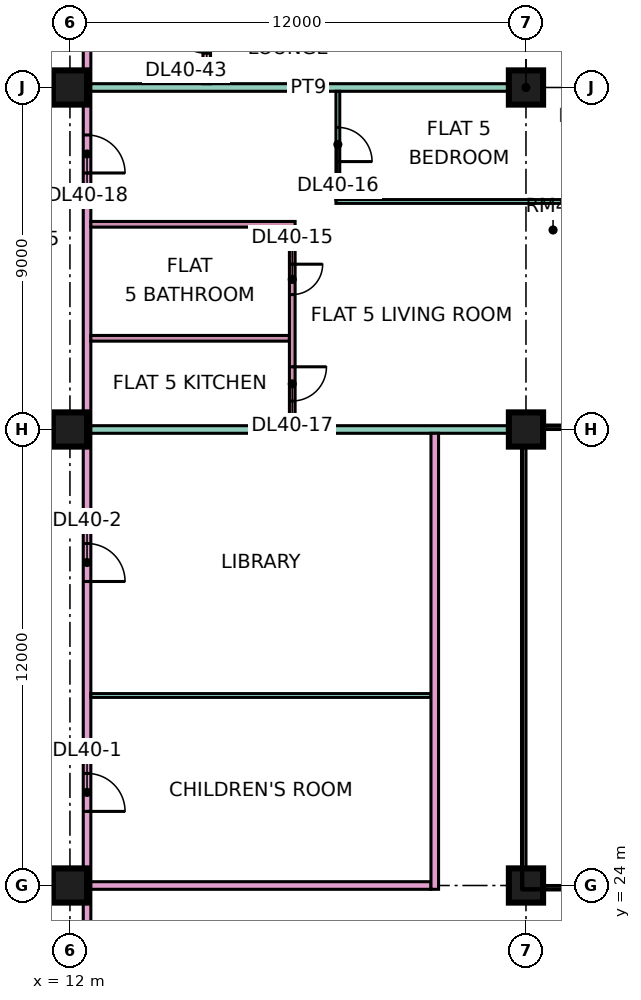
"""IFC4 building model, lengths in metres.
Left out: names, types, materials, properties, quantities, classifications, styles, units other than length and angle.
Written with IfcOpenShell. Run it as: python <this file> out.ifc"""

import sys

from ifc_helpers import new_model, si_unit, direction, frame, frame_2d, origin, origin_2d, place, context, subcontext, project, spatial, rectangle, extrude, element, fill, save


model = new_model("IFC4")
c1 = context("Model", 3, precision=1e-05, world=origin(), true_north=direction((0.0, 1.0)))
c2 = subcontext(c1, "Body", "Model", "MODEL_VIEW")
j1 = project(units=[si_unit("LENGTHUNIT", "METRE"), si_unit("PLANEANGLEUNIT", "RADIAN")], contexts=[c1])
p1 = place(None, origin())
s1 = spatial("IfcSite", under=j1, at=p1, CompositionType="ELEMENT")
p2 = place(p1, origin())
s2 = spatial("IfcBuilding", under=s1, at=p2, CompositionType="ELEMENT")
p3 = place(p2, frame((0.0, 0.0, 176.15)))
s3 = spatial("IfcBuildingStorey", under=s2, at=p3, CompositionType="ELEMENT", Elevation=176.15)
for number, where, z_axis, x_axis in (
    (1, (12.0, 24.0, 0.0), (0.0, 0.0, 1.0), (1.0, 0.0, 0.0)),
    (2, (12.0, 36.0, 0.0), (0.0, 0.0, 1.0), (1.0, 0.0, 0.0)),
    (3, (12.0, 45.0, 0.0), (0.0, 0.0, 1.0), (1.0, 0.0, 0.0)),
    (4, (24.0, 24.0, 0.0), (0.0, 0.0, 1.0), (1.0, 0.0, 0.0)),
    (5, (24.0, 36.0, 0.0), (0.0, 0.0, 1.0), (1.0, 0.0, 0.0)),
    (6, (24.0, 45.0, 0.0), (0.0, 0.0, 1.0), (1.0, 0.0, 0.0)),
):
    element("IfcColumn", number, at=place(p3, frame(where, z_axis=z_axis, x_axis=x_axis)), inside=s3, PredefinedType="COLUMN", context=c2, shape_type="SweptSolid", body=[
        extrude(rectangle(XDim=0.9, YDim=0.9, at=origin_2d()), origin(), (0.0, 0.0, 1.0), 3.75),
    ])
p4 = place(p3, frame((12.45, 20.0, 0.0), z_axis=(0.0, 0.0, 1.0), x_axis=(0.0, 1.0, 0.0)))
e7 = element("IfcWall", 7, at=p4, inside=s3, PredefinedType="PARTITIONING", context=c2, shape_type="SweptSolid", body=[
    extrude(rectangle(XDim=43.0, YDim=0.2, at=frame_2d((21.5, 0.0))), origin(), (0.0, 0.0, 1.0), 3.35),
])
p5 = place(p4, frame((5.95, 0.0, 0.0)))
e8 = element("IfcOpeningElement", 8, at=p5, cuts=e7, PredefinedType="OPENING", context=c2, shape_type="SweptSolid", body=[
    extrude(rectangle(XDim=1.0, YDim=2.1, at=frame_2d((0.5, 1.05))), frame((0.0, 0.11, 0.0), z_axis=(0.0, -1.0, 0.0), x_axis=(1.0, 0.0, 0.0)), (0.0, 0.0, 1.0), 0.22),
])
p6 = place(p4, frame((12.0, 0.0, 0.0)))
e9 = element("IfcOpeningElement", 9, at=p6, cuts=e7, PredefinedType="OPENING", context=c2, shape_type="SweptSolid", body=[
    extrude(rectangle(XDim=1.0, YDim=2.1, at=frame_2d((0.5, 1.05))), frame((0.0, 0.11, 0.0), z_axis=(0.0, -1.0, 0.0), x_axis=(1.0, 0.0, 0.0)), (0.0, 0.0, 1.0), 0.22),
])
p7 = place(p4, frame((22.75, 0.0, 0.0)))
e10 = element("IfcOpeningElement", 10, at=p7, cuts=e7, PredefinedType="OPENING", context=c2, shape_type="SweptSolid", body=[
    extrude(rectangle(XDim=1.0, YDim=2.1, at=frame_2d((0.5, 1.05))), frame((0.0, 0.11, 0.0), z_axis=(0.0, -1.0, 0.0), x_axis=(1.0, 0.0, 0.0)), (0.0, 0.0, 1.0), 0.22),
])
p8 = place(p4, frame((34.75, 0.0, 0.0)))
e11 = element("IfcOpeningElement", 11, at=p8, cuts=e7, PredefinedType="OPENING", context=c2, shape_type="SweptSolid", body=[
    extrude(rectangle(XDim=1.0, YDim=2.1, at=frame_2d((0.5, 1.05))), frame((0.0, 0.11, 0.0), z_axis=(0.0, -1.0, 0.0), x_axis=(1.0, 0.0, 0.0)), (0.0, 0.0, 1.0), 0.22),
])
p9 = place(p4, frame((1.15, 0.0, 0.0)))
e12 = element("IfcOpeningElement", 12, at=p9, cuts=e7, PredefinedType="OPENING", context=c2, shape_type="SweptSolid", body=[
    extrude(rectangle(XDim=1.8, YDim=2.1, at=frame_2d((0.9, 1.05))), frame((0.0, 0.11, 0.0), z_axis=(0.0, -1.0, 0.0), x_axis=(1.0, 0.0, 0.0)), (0.0, 0.0, 1.0), 0.22),
])
p10 = place(p4, frame((28.6, 0.0, 0.0)))
e13 = element("IfcOpeningElement", 13, at=p10, cuts=e7, PredefinedType="OPENING", context=c2, shape_type="SweptSolid", body=[
    extrude(rectangle(XDim=1.8, YDim=2.1, at=frame_2d((0.9, 1.05))), frame((0.0, 0.11, 0.0), z_axis=(0.0, -1.0, 0.0), x_axis=(1.0, 0.0, 0.0)), (0.0, 0.0, 1.0), 0.22),
])
p11 = place(p3, frame((12.55, 24.0, 0.0), z_axis=(0.0, 0.0, 1.0), x_axis=(1.0, 0.0, 0.0)))
e14 = element("IfcWall", 14, at=p11, inside=s3, PredefinedType="PARTITIONING", context=c2, shape_type="SweptSolid", body=[
    extrude(rectangle(XDim=8.95, YDim=0.2, at=frame_2d((4.475, 0.0))), origin(), (0.0, 0.0, 1.0), 3.35),
])
p12 = place(p3, frame((12.55, 29.0, 0.0), z_axis=(0.0, 0.0, 1.0), x_axis=(1.0, 0.0, 0.0)))
e15 = element("IfcWall", 15, at=p12, inside=s3, PredefinedType="PARTITIONING", context=c2, shape_type="SweptSolid", body=[
    extrude(rectangle(XDim=8.95, YDim=0.1, at=frame_2d((4.475, 0.0))), origin(), (0.0, 0.0, 1.0), 3.35),
])
p13 = place(p3, frame((12.55, 36.0, 0.0), z_axis=(0.0, 0.0, 1.0), x_axis=(1.0, 0.0, 0.0)))
e16 = element("IfcWall", 16, at=p13, inside=s3, PredefinedType="PARTITIONING", context=c2, shape_type="SweptSolid", body=[
    extrude(rectangle(XDim=11.45, YDim=0.2, at=frame_2d((5.725, 0.0))), origin(), (0.0, 0.0, 1.0), 3.35),
])
p14 = place(p3, frame((12.55, 38.4, 0.0), z_axis=(0.0, 0.0, 1.0), x_axis=(1.0, 0.0, 0.0)))
e17 = element("IfcWall", 17, at=p14, inside=s3, PredefinedType="PARTITIONING", context=c2, shape_type="SweptSolid", body=[
    extrude(rectangle(XDim=5.225, YDim=0.15, at=frame_2d((2.612, 0.0))), origin(), (0.0, 0.0, 1.0), 3.35),
])
p15 = place(p3, frame((12.55, 41.4, 0.0), z_axis=(0.0, 0.0, 1.0), x_axis=(1.0, 0.0, 0.0)))
e18 = element("IfcWall", 18, at=p15, inside=s3, PredefinedType="PARTITIONING", context=c2, shape_type="SweptSolid", body=[
    extrude(rectangle(XDim=5.375, YDim=0.15, at=frame_2d((2.688, 0.0))), origin(), (0.0, 0.0, 1.0), 3.35),
])
p16 = place(p3, frame((12.55, 45.0, 0.0), z_axis=(0.0, 0.0, 1.0), x_axis=(1.0, 0.0, 0.0)))
e19 = element("IfcWall", 19, at=p16, inside=s3, PredefinedType="PARTITIONING", context=c2, shape_type="SweptSolid", body=[
    extrude(rectangle(XDim=11.45, YDim=0.2, at=frame_2d((5.725, 0.0))), origin(), (0.0, 0.0, 1.0), 3.35),
])
p17 = place(p3, frame((15.6, 45.1, 0.0), z_axis=(0.0, 0.0, 1.0), x_axis=(0.0, 1.0, 0.0)))
e20 = element("IfcWall", 20, at=p17, inside=s3, PredefinedType="PARTITIONING", context=c2, shape_type="SweptSolid", body=[
    extrude(rectangle(XDim=2.675, YDim=0.2, at=frame_2d((1.337, 0.0))), origin(), (0.0, 0.0, 1.0), 3.35),
])
p18 = place(p17, frame((0.8, 0.0, 0.0)))
e21 = element("IfcOpeningElement", 21, at=p18, cuts=e20, PredefinedType="OPENING", context=c2, shape_type="SweptSolid", body=[
    extrude(rectangle(XDim=1.0, YDim=2.1, at=frame_2d((0.5, 1.05))), frame((0.0, 0.11, 0.0), z_axis=(0.0, -1.0, 0.0), x_axis=(1.0, 0.0, 0.0)), (0.0, 0.0, 1.0), 0.22),
])
p19 = place(p3, frame((17.85, 36.1, 0.0), z_axis=(0.0, 0.0, 1.0), x_axis=(0.0, 1.0, 0.0)))
e22 = element("IfcWall", 22, at=p19, inside=s3, PredefinedType="PARTITIONING", context=c2, shape_type="SweptSolid", body=[
    extrude(rectangle(XDim=5.225, YDim=0.15, at=frame_2d((2.612, 0.0))), origin(), (0.0, 0.0, 1.0), 3.35),
])
p20 = place(p19, frame((3.45, 0.0, 0.0)))
e23 = element("IfcOpeningElement", 23, at=p20, cuts=e22, PredefinedType="OPENING", context=c2, shape_type="SweptSolid", body=[
    extrude(rectangle(XDim=0.8, YDim=2.1, at=frame_2d((0.4, 1.05))), frame((0.0, 0.085, 0.0), z_axis=(0.0, -1.0, 0.0), x_axis=(1.0, 0.0, 0.0)), (0.0, 0.0, 1.0), 0.17),
])
p21 = place(p19, frame((0.65, 0.0, 0.0)))
e24 = element("IfcOpeningElement", 24, at=p21, cuts=e22, PredefinedType="OPENING", context=c2, shape_type="SweptSolid", body=[
    extrude(rectangle(XDim=0.9, YDim=2.1, at=frame_2d((0.45, 1.05))), frame((0.0, 0.085, 0.0), z_axis=(0.0, -1.0, 0.0), x_axis=(1.0, 0.0, 0.0)), (0.0, 0.0, 1.0), 0.17),
])
p22 = place(p3, frame((19.0, 42.0, 0.0), z_axis=(0.0, 0.0, 1.0), x_axis=(1.0, 0.0, 0.0)))
e25 = element("IfcWall", 25, at=p22, inside=s3, PredefinedType="PARTITIONING", context=c2, shape_type="SweptSolid", body=[
    extrude(rectangle(XDim=6.35, YDim=0.1, at=frame_2d((3.175, 0.0))), origin(), (0.0, 0.0, 1.0), 3.35),
])
p23 = place(p3, frame((19.05, 42.05, 0.0), z_axis=(0.0, 0.0, 1.0), x_axis=(0.0, 1.0, 0.0)))
e26 = element("IfcWall", 26, at=p23, inside=s3, PredefinedType="PARTITIONING", context=c2, shape_type="SweptSolid", body=[
    extrude(rectangle(XDim=2.85, YDim=0.1, at=frame_2d((1.425, 0.0))), origin(), (0.0, 0.0, 1.0), 3.35),
])
p24 = place(p23, frame((1.0, 0.0, 0.0)))
e27 = element("IfcOpeningElement", 27, at=p24, cuts=e26, PredefinedType="OPENING", context=c2, shape_type="SweptSolid", body=[
    extrude(rectangle(XDim=0.9, YDim=2.1, at=frame_2d((0.45, 1.05))), frame((0.0, 0.06, 0.0), z_axis=(0.0, -1.0, 0.0), x_axis=(1.0, 0.0, 0.0)), (0.0, 0.0, 1.0), 0.12),
])
p25 = place(p3, frame((21.6, 23.9, 0.0), z_axis=(0.0, 0.0, 1.0), x_axis=(0.0, 1.0, 0.0)))
e28 = element("IfcWall", 28, at=p25, inside=s3, PredefinedType="PARTITIONING", context=c2, shape_type="SweptSolid", body=[
    extrude(rectangle(XDim=12.0, YDim=0.2, at=frame_2d((6.0, 0.0))), origin(), (0.0, 0.0, 1.0), 3.35),
])
p26 = place(p5, frame((1.0, 0.0, 0.0), z_axis=(0.0, 0.0, 1.0), x_axis=(-1.0, 0.0, 0.0)))
e29 = element("IfcDoor", 29, at=p26, inside=s3, OperationType="SINGLE_SWING_LEFT", PredefinedType="DOOR", context=c2, shape_type="SweptSolid", body=[
    extrude(rectangle(XDim=1.0, YDim=2.1, at=frame_2d((0.5, 1.05))), frame((0.0, 0.025, 0.0), z_axis=(0.0, -1.0, 0.0), x_axis=(1.0, 0.0, 0.0)), (0.0, 0.0, 1.0), 0.05),
])
fill(e8, e29)
p27 = place(p6, frame((1.0, 0.0, 0.0), z_axis=(0.0, 0.0, 1.0), x_axis=(-1.0, 0.0, 0.0)))
e30 = element("IfcDoor", 30, at=p27, inside=s3, OperationType="SINGLE_SWING_LEFT", PredefinedType="DOOR", context=c2, shape_type="SweptSolid", body=[
    extrude(rectangle(XDim=1.0, YDim=2.1, at=frame_2d((0.5, 1.05))), frame((0.0, 0.025, 0.0), z_axis=(0.0, -1.0, 0.0), x_axis=(1.0, 0.0, 0.0)), (0.0, 0.0, 1.0), 0.05),
])
fill(e9, e30)
p28 = place(p20, origin())
e31 = element("IfcDoor", 31, at=p28, inside=s3, OperationType="SINGLE_SWING_RIGHT", PredefinedType="DOOR", context=c2, shape_type="SweptSolid", body=[
    extrude(rectangle(XDim=0.8, YDim=2.1, at=frame_2d((0.4, 1.05))), frame((0.0, 0.025, 0.0), z_axis=(0.0, -1.0, 0.0), x_axis=(1.0, 0.0, 0.0)), (0.0, 0.0, 1.0), 0.05),
])
fill(e23, e31)
p29 = place(p24, frame((0.9, 0.0, 0.0), z_axis=(0.0, 0.0, 1.0), x_axis=(-1.0, 0.0, 0.0)))
e32 = element("IfcDoor", 32, at=p29, inside=s3, OperationType="SINGLE_SWING_LEFT", PredefinedType="DOOR", context=c2, shape_type="SweptSolid", body=[
    extrude(rectangle(XDim=0.9, YDim=2.1, at=frame_2d((0.45, 1.05))), frame((0.0, 0.025, 0.0), z_axis=(0.0, -1.0, 0.0), x_axis=(1.0, 0.0, 0.0)), (0.0, 0.0, 1.0), 0.05),
])
fill(e27, e32)
p30 = place(p21, origin())
e33 = element("IfcDoor", 33, at=p30, inside=s3, OperationType="SINGLE_SWING_RIGHT", PredefinedType="DOOR", context=c2, shape_type="SweptSolid", body=[
    extrude(rectangle(XDim=0.9, YDim=2.1, at=frame_2d((0.45, 1.05))), frame((0.0, 0.025, 0.0), z_axis=(0.0, -1.0, 0.0), x_axis=(1.0, 0.0, 0.0)), (0.0, 0.0, 1.0), 0.05),
])
fill(e24, e33)
p31 = place(p7, frame((1.0, 0.0, 0.0), z_axis=(0.0, 0.0, 1.0), x_axis=(-1.0, 0.0, 0.0)))
e34 = element("IfcDoor", 34, at=p31, inside=s3, OperationType="SINGLE_SWING_LEFT", PredefinedType="DOOR", context=c2, shape_type="SweptSolid", body=[
    extrude(rectangle(XDim=1.0, YDim=2.1, at=frame_2d((0.5, 1.05))), frame((0.0, 0.025, 0.0), z_axis=(0.0, -1.0, 0.0), x_axis=(1.0, 0.0, 0.0)), (0.0, 0.0, 1.0), 0.05),
])
fill(e10, e34)
p32 = place(p18, frame((1.0, 0.0, 0.0), z_axis=(0.0, 0.0, 1.0), x_axis=(-1.0, 0.0, 0.0)))
e35 = element("IfcDoor", 35, at=p32, inside=s3, OperationType="SINGLE_SWING_RIGHT", PredefinedType="DOOR", context=c2, shape_type="SweptSolid", body=[
    extrude(rectangle(XDim=1.0, YDim=2.1, at=frame_2d((0.5, 1.05))), frame((0.0, 0.025, 0.0), z_axis=(0.0, -1.0, 0.0), x_axis=(1.0, 0.0, 0.0)), (0.0, 0.0, 1.0), 0.05),
])
fill(e21, e35)
save(model, sys.argv[1])
